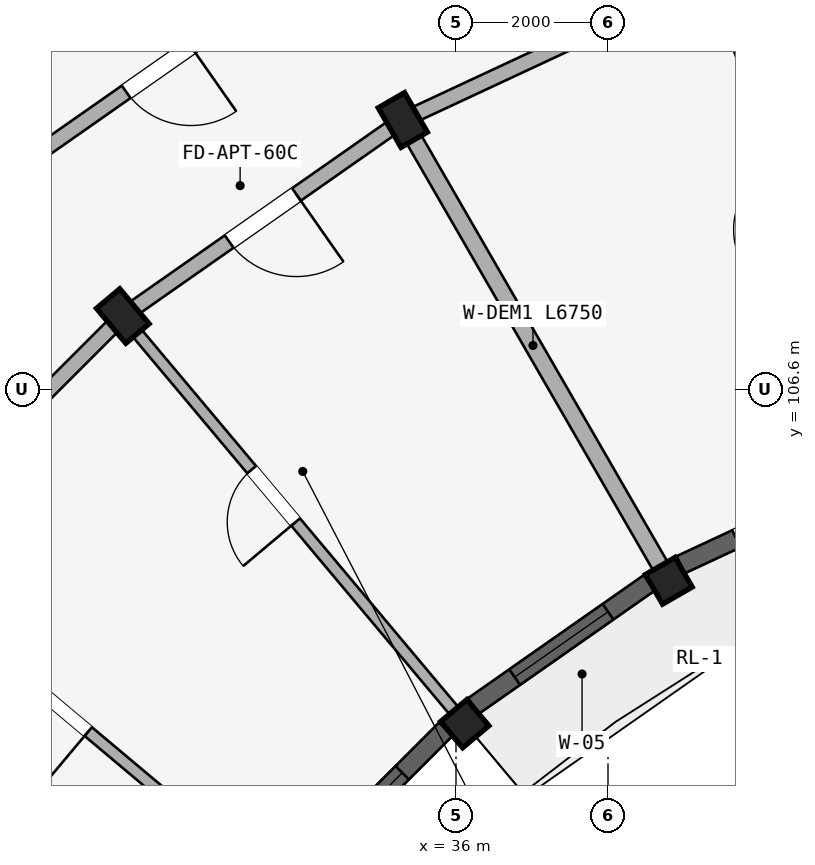
"""IFC4 building model, lengths in metres.
Left out: names, types, materials, properties, quantities, classifications, styles, units other than length and angle.
Written with IfcOpenShell. Run it as: python <this file> out.ifc"""

import sys

from ifc_helpers import new_model, si_unit, direction, frame, frame_2d, origin, origin_2d, place, context, subcontext, project, spatial, rectangle, extrude, element, fill, save


model = new_model("IFC4")
c1 = context("Model", 3, precision=1e-05, world=origin(), true_north=direction((0.0, 1.0)))
c2 = subcontext(c1, "Body", "Model", "MODEL_VIEW")
j1 = project(units=[si_unit("LENGTHUNIT", "METRE"), si_unit("PLANEANGLEUNIT", "RADIAN")], contexts=[c1])
p1 = place(None, origin())
s1 = spatial("IfcSite", under=j1, at=p1, CompositionType="ELEMENT")
p2 = place(p1, origin())
s2 = spatial("IfcBuilding", under=s1, at=p2, CompositionType="ELEMENT")
p3 = place(p2, frame((0.0, 0.0, 43.35)))
s3 = spatial("IfcBuildingStorey", under=s2, at=p3, CompositionType="ELEMENT", Elevation=43.35)
p4 = place(p3, frame((38.8, 104.081, 0.0), z_axis=(0.0, 0.0, 1.0), x_axis=(0.866025403784, 0.5, 0.0)))
e1 = element("IfcColumn", 1, at=p4, inside=s3, PredefinedType="COLUMN", context=c2, shape_type="SweptSolid", body=[
    extrude(rectangle(XDim=0.45, YDim=0.45, at=origin_2d()), origin(), (0.0, 0.0, 1.0), 2.93),
])
p5 = place(p3, frame((35.3, 110.144, 0.0), z_axis=(0.0, 0.0, 1.0), x_axis=(0.866025403784, 0.5, 0.0)))
e2 = element("IfcColumn", 2, at=p5, inside=s3, PredefinedType="COLUMN", context=c2, shape_type="SweptSolid", body=[
    extrude(rectangle(XDim=0.4, YDim=0.6, at=origin_2d()), origin(), (0.0, 0.0, 1.0), 2.93),
])
p6 = place(p3, frame((36.115, 102.202, 0.0), z_axis=(0.0, 0.0, 1.0), x_axis=(0.766044443119, 0.642787609687, 0.0)))
e3 = element("IfcColumn", 3, at=p6, inside=s3, PredefinedType="COLUMN", context=c2, shape_type="SweptSolid", body=[
    extrude(rectangle(XDim=0.45, YDim=0.45, at=origin_2d()), origin(), (0.0, 0.0, 1.0), 2.93),
])
p7 = place(p3, frame((31.616, 107.564, 0.0), z_axis=(0.0, 0.0, 1.0), x_axis=(0.766044443119, 0.642787609687, 0.0)))
e4 = element("IfcColumn", 4, at=p7, inside=s3, PredefinedType="COLUMN", context=c2, shape_type="SweptSolid", body=[
    extrude(rectangle(XDim=0.4, YDim=0.6, at=origin_2d()), origin(), (0.0, 0.0, 1.0), 2.93),
])
p8 = place(p3, frame((39.376, 112.044, 0.0), z_axis=(0.0, 0.0, 1.0), x_axis=(-0.906307919131, -0.422617978463, 0.0)))
e5 = element("IfcWall", 5, at=p8, inside=s3, PredefinedType="STANDARD", context=c2, shape_type="SweptSolid", body=[
    extrude(rectangle(XDim=4.497, YDim=0.2, at=frame_2d((2.249, 0.0))), origin(), (0.0, 0.0, 1.0), 2.372),
])
p9 = place(p3, frame((35.3, 110.144, 0.0), z_axis=(0.0, 0.0, 1.0), x_axis=(-0.819155404658, -0.573571637217, 0.0)))
e6 = element("IfcWall", 6, at=p9, inside=s3, PredefinedType="STANDARD", context=c2, shape_type="SweptSolid", body=[
    extrude(rectangle(XDim=4.497, YDim=0.2, at=frame_2d((2.249, 0.0))), origin(), (0.0, 0.0, 1.0), 2.372),
])
p10 = place(p9, frame((1.709, 0.0, 0.0)))
e7 = element("IfcOpeningElement", 7, at=p10, cuts=e6, PredefinedType="OPENING", context=c2, shape_type="SweptSolid", body=[
    extrude(rectangle(XDim=1.08, YDim=2.15, at=frame_2d((0.54, 1.075))), frame((0.0, 0.11, 0.0), z_axis=(0.0, -1.0, 0.0), x_axis=(1.0, 0.0, 0.0)), (0.0, 0.0, 1.0), 0.22),
])
p11 = place(p3, frame((34.1, 112.222, 0.0), z_axis=(0.0, 0.0, 1.0), x_axis=(-0.819140911474, -0.573592335331, 0.0)))
e8 = element("IfcWall", 8, at=p11, inside=s3, PredefinedType="STANDARD", context=c2, shape_type="SweptSolid", body=[
    extrude(rectangle(XDim=4.916, YDim=0.2, at=frame_2d((2.458, 0.0))), origin(), (0.0, 0.0, 1.0), 2.372),
])
p12 = place(p11, frame((1.938, 0.0, 0.0)))
e9 = element("IfcOpeningElement", 9, at=p12, cuts=e8, PredefinedType="OPENING", context=c2, shape_type="SweptSolid", body=[
    extrude(rectangle(XDim=1.04, YDim=2.15, at=frame_2d((0.52, 1.075))), frame((0.0, 0.11, 0.0), z_axis=(0.0, -1.0, 0.0), x_axis=(1.0, 0.0, 0.0)), (0.0, 0.0, 1.0), 0.22),
])
p13 = place(p3, frame((31.616, 107.564, 0.0), z_axis=(0.0, 0.0, 1.0), x_axis=(-0.707106781187, -0.707106781187, 0.0)))
e10 = element("IfcWall", 10, at=p13, inside=s3, PredefinedType="STANDARD", context=c2, shape_type="SweptSolid", body=[
    extrude(rectangle(XDim=4.497, YDim=0.2, at=frame_2d((2.249, 0.0))), origin(), (0.0, 0.0, 1.0), 2.372),
])
p14 = place(p3, frame((41.702, 105.654, 0.0), z_axis=(0.0, 0.0, 1.0), x_axis=(-0.342010221662, 0.939696231917, 0.0)))
e11 = element("IfcWall", 11, at=p14, inside=s3, PredefinedType="PARTITIONING", context=c2, shape_type="SweptSolid", body=[
    extrude(rectangle(XDim=6.75, YDim=0.15, at=frame_2d((3.375, 0.0))), origin(), (0.0, 0.0, 1.0), 2.372),
])
p15 = place(p14, frame((3.242, 0.0, 0.0)))
e12 = element("IfcOpeningElement", 12, at=p15, cuts=e11, PredefinedType="OPENING", context=c2, shape_type="SweptSolid", body=[
    extrude(rectangle(XDim=0.94, YDim=2.1, at=frame_2d((0.47, 1.05))), frame((0.0, 0.085, 0.0), z_axis=(0.0, -1.0, 0.0), x_axis=(1.0, 0.0, 0.0)), (0.0, 0.0, 1.0), 0.17),
])
p16 = place(p3, frame((38.7, 104.254, 0.0), z_axis=(0.0, 0.0, 1.0), x_axis=(-0.499997969693, 0.866026575979, 0.0)))
e13 = element("IfcWall", 13, at=p16, inside=s3, PredefinedType="STANDARD", context=c2, shape_type="SweptSolid", body=[
    extrude(rectangle(XDim=6.75, YDim=0.22, at=frame_2d((3.375, 0.0))), origin(), (0.0, 0.0, 1.0), 2.372),
])
p17 = place(p3, frame((35.987, 102.355, 0.0), z_axis=(0.0, 0.0, 1.0), x_axis=(-0.642784846501, 0.766046761698, 0.0)))
e14 = element("IfcWall", 14, at=p17, inside=s3, PredefinedType="PARTITIONING", context=c2, shape_type="SweptSolid", body=[
    extrude(rectangle(XDim=6.75, YDim=0.15, at=frame_2d((3.375, 0.0))), origin(), (0.0, 0.0, 1.0), 2.372),
])
p18 = place(p17, frame((3.262, 0.0, 0.0)))
e15 = element("IfcOpeningElement", 15, at=p18, cuts=e14, PredefinedType="OPENING", context=c2, shape_type="SweptSolid", body=[
    extrude(rectangle(XDim=0.9, YDim=2.1, at=frame_2d((0.45, 1.05))), frame((0.0, 0.085, 0.0), z_axis=(0.0, -1.0, 0.0), x_axis=(1.0, 0.0, 0.0)), (0.0, 0.0, 1.0), 0.17),
])
p19 = place(p3, frame((33.645, 100.013, 0.0), z_axis=(0.0, 0.0, 1.0), x_axis=(-0.766046761698, 0.642784846501, 0.0)))
e16 = element("IfcWall", 16, at=p19, inside=s3, PredefinedType="PARTITIONING", context=c2, shape_type="SweptSolid", body=[
    extrude(rectangle(XDim=6.75, YDim=0.15, at=frame_2d((3.375, 0.0))), origin(), (0.0, 0.0, 1.0), 2.372),
])
p20 = place(p19, frame((3.242, 0.0, 0.0)))
e17 = element("IfcOpeningElement", 17, at=p20, cuts=e16, PredefinedType="OPENING", context=c2, shape_type="SweptSolid", body=[
    extrude(rectangle(XDim=0.94, YDim=2.1, at=frame_2d((0.47, 1.05))), frame((0.0, 0.085, 0.0), z_axis=(0.0, -1.0, 0.0), x_axis=(1.0, 0.0, 0.0)), (0.0, 0.0, 1.0), 0.17),
])
p21 = place(p3, frame((41.51, 105.483, 0.0), z_axis=(0.0, 0.0, 1.0), x_axis=(-0.906284857185, -0.422667431484, 0.0)))
e18 = element("IfcWall", 18, at=p21, inside=s3, PredefinedType="STANDARD", context=c2, shape_type="SweptSolid", body=[
    extrude(rectangle(XDim=2.82, YDim=0.25, at=frame_2d((1.41, 0.0))), origin(), (0.0, 0.0, 1.0), 2.422),
])
p22 = place(p21, frame((0.81, 0.0, 0.0)))
e19 = element("IfcOpeningElement", 19, at=p22, cuts=e18, PredefinedType="OPENING", context=c2, shape_type="SweptSolid", body=[
    extrude(rectangle(XDim=1.2, YDim=2.15, at=frame_2d((0.6, 1.075))), frame((0.0, 0.135, 0.0), z_axis=(0.0, -1.0, 0.0), x_axis=(1.0, 0.0, 0.0)), (0.0, 0.0, 1.0), 0.27),
])
p23 = place(p3, frame((38.541, 104.053, 0.0), z_axis=(0.0, 0.0, 1.0), x_axis=(-0.819154644592, -0.573572722716, 0.0)))
e20 = element("IfcWall", 20, at=p23, inside=s3, PredefinedType="STANDARD", context=c2, shape_type="SweptSolid", body=[
    extrude(rectangle(XDim=2.82, YDim=0.25, at=frame_2d((1.41, 0.0))), origin(), (0.0, 0.0, 1.0), 2.422),
])
p24 = place(p23, frame((0.66, 0.0, 0.572)))
e21 = element("IfcOpeningElement", 21, at=p24, cuts=e20, PredefinedType="OPENING", context=c2, shape_type="SweptSolid", body=[
    extrude(rectangle(XDim=1.5, YDim=1.65, at=frame_2d((0.75, 0.825))), frame((0.0, 0.135, 0.0), z_axis=(0.0, -1.0, 0.0), x_axis=(1.0, 0.0, 0.0)), (0.0, 0.0, 1.0), 0.27),
])
p25 = place(p3, frame((35.866, 102.128, 0.0), z_axis=(0.0, 0.0, 1.0), x_axis=(-0.707106781187, -0.707106781187, 0.0)))
e22 = element("IfcWall", 22, at=p25, inside=s3, PredefinedType="STANDARD", context=c2, shape_type="SweptSolid", body=[
    extrude(rectangle(XDim=2.82, YDim=0.25, at=frame_2d((1.41, 0.0))), origin(), (0.0, 0.0, 1.0), 2.422),
])
p26 = place(p25, frame((0.81, 0.0, 0.722)))
e23 = element("IfcOpeningElement", 23, at=p26, cuts=e22, PredefinedType="OPENING", context=c2, shape_type="SweptSolid", body=[
    extrude(rectangle(XDim=1.2, YDim=1.5, at=frame_2d((0.6, 0.75))), frame((0.0, 0.135, 0.0), z_axis=(0.0, -1.0, 0.0), x_axis=(1.0, 0.0, 0.0)), (0.0, 0.0, 1.0), 0.27),
])
p27 = place(p24, origin())
e24 = element("IfcWindow", 24, at=p27, inside=s3, PartitioningType="DOUBLE_PANEL_VERTICAL", PredefinedType="WINDOW", context=c2, shape_type="SweptSolid", body=[
    extrude(rectangle(XDim=1.5, YDim=1.65, at=frame_2d((0.75, 0.825))), frame((0.0, 0.03, 0.0), z_axis=(0.0, -1.0, 0.0), x_axis=(1.0, 0.0, 0.0)), (0.0, 0.0, 1.0), 0.06),
])
fill(e21, e24)
p28 = place(p26, origin())
e25 = element("IfcWindow", 25, at=p28, inside=s3, PartitioningType="SINGLE_PANEL", PredefinedType="WINDOW", context=c2, shape_type="SweptSolid", body=[
    extrude(rectangle(XDim=1.2, YDim=1.5, at=frame_2d((0.6, 0.75))), frame((0.0, 0.03, 0.0), z_axis=(0.0, -1.0, 0.0), x_axis=(1.0, 0.0, 0.0)), (0.0, 0.0, 1.0), 0.06),
])
fill(e23, e25)
p29 = place(p18, origin())
e26 = element("IfcDoor", 26, at=p29, inside=s3, OperationType="SINGLE_SWING_LEFT", PredefinedType="DOOR", context=c2, shape_type="SweptSolid", body=[
    extrude(rectangle(XDim=0.9, YDim=2.1, at=frame_2d((0.45, 1.05))), frame((0.0, 0.025, 0.0), z_axis=(0.0, -1.0, 0.0), x_axis=(1.0, 0.0, 0.0)), (0.0, 0.0, 1.0), 0.05),
])
fill(e15, e26)
p30 = place(p20, origin())
e27 = element("IfcDoor", 27, at=p30, inside=s3, OperationType="SINGLE_SWING_LEFT", PredefinedType="DOOR", context=c2, shape_type="SweptSolid", body=[
    extrude(rectangle(XDim=0.94, YDim=2.1, at=frame_2d((0.47, 1.05))), frame((0.0, 0.025, 0.0), z_axis=(0.0, -1.0, 0.0), x_axis=(1.0, 0.0, 0.0)), (0.0, 0.0, 1.0), 0.05),
])
fill(e17, e27)
p31 = place(p12, origin())
e28 = element("IfcDoor", 28, at=p31, inside=s3, OperationType="SINGLE_SWING_LEFT", PredefinedType="DOOR", context=c2, shape_type="SweptSolid", body=[
    extrude(rectangle(XDim=1.04, YDim=2.15, at=frame_2d((0.52, 1.075))), frame((0.0, 0.025, 0.0), z_axis=(0.0, -1.0, 0.0), x_axis=(1.0, 0.0, 0.0)), (0.0, 0.0, 1.0), 0.05),
])
fill(e9, e28)
p32 = place(p10, origin())
e29 = element("IfcDoor", 29, at=p32, inside=s3, OperationType="SINGLE_SWING_LEFT", PredefinedType="DOOR", context=c2, shape_type="SweptSolid", body=[
    extrude(rectangle(XDim=1.08, YDim=2.15, at=frame_2d((0.54, 1.075))), frame((0.0, 0.025, 0.0), z_axis=(0.0, -1.0, 0.0), x_axis=(1.0, 0.0, 0.0)), (0.0, 0.0, 1.0), 0.05),
])
fill(e7, e29)
save(model, sys.argv[1])
